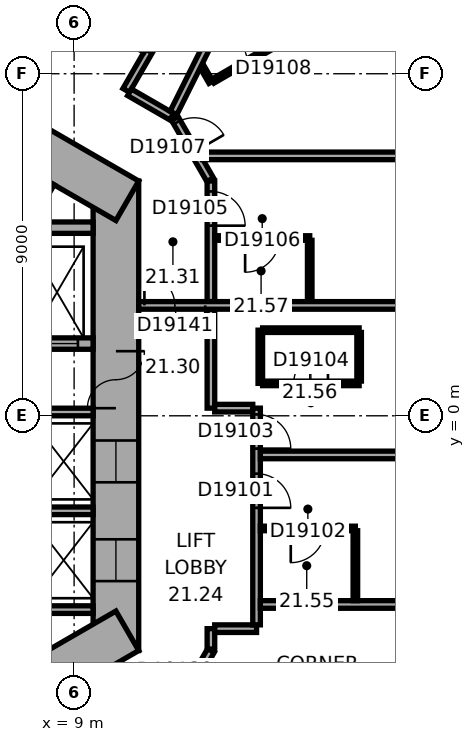
"""IFC4 building model, lengths in metres.
Left out: names, types, materials, properties, quantities, classifications, styles, units other than length and angle.
Written with IfcOpenShell. Run it as: python <this file> out.ifc"""

import sys

from ifc_helpers import new_model, si_unit, direction, frame, frame_2d, origin, place, context, subcontext, project, spatial, rectangle, extrude, element, fill, save


model = new_model("IFC4")
c1 = context("Model", 3, precision=1e-05, world=origin(), true_north=direction((0.0, 1.0)))
c2 = subcontext(c1, "Body", "Model", "MODEL_VIEW")
j1 = project(units=[si_unit("LENGTHUNIT", "METRE"), si_unit("PLANEANGLEUNIT", "RADIAN")], contexts=[c1])
p1 = place(None, origin())
s1 = spatial("IfcSite", under=j1, at=p1, CompositionType="ELEMENT")
p2 = place(p1, origin())
s2 = spatial("IfcBuilding", under=s1, at=p2, CompositionType="ELEMENT")
p3 = place(p2, frame((0.0, 0.0, 93.5)))
s3 = spatial("IfcBuildingStorey", under=s2, at=p3, CompositionType="ELEMENT", Elevation=93.5)
p4 = place(p3, frame((10.1, -6.177, 0.0), z_axis=(0.0, 0.0, 1.0), x_axis=(0.0, 1.0, 0.0)))
e1 = element("IfcWall", 1, at=p4, inside=s3, PredefinedType="SHEAR", context=c2, shape_type="SweptSolid", body=[
    extrude(rectangle(XDim=12.355, YDim=1.2, at=frame_2d((6.177, 0.0))), origin(), (0.0, 0.0, 1.0), 3.3),
])
p5 = place(p4, frame((6.378, 0.0, 0.0)))
e2 = element("IfcOpeningElement", 2, at=p5, cuts=e1, PredefinedType="OPENING", context=c2, shape_type="SweptSolid", body=[
    extrude(rectangle(XDim=1.5, YDim=2.1, at=frame_2d((0.75, 1.05))), frame((0.0, 0.61, 0.0), z_axis=(0.0, -1.0, 0.0), x_axis=(1.0, 0.0, 0.0)), (0.0, 0.0, 1.0), 1.22),
])
p6 = place(p4, frame((1.828, 0.0, 0.0)))
e3 = element("IfcOpeningElement", 3, at=p6, cuts=e1, PredefinedType="OPENING", context=c2, shape_type="SweptSolid", body=[
    extrude(rectangle(XDim=1.1, YDim=2.1, at=frame_2d((0.55, 1.05))), frame((0.0, 0.61, 0.0), z_axis=(0.0, -1.0, 0.0), x_axis=(1.0, 0.0, 0.0)), (0.0, 0.0, 1.0), 1.22),
])
p7 = place(p4, frame((4.427, 0.0, 0.0)))
e4 = element("IfcOpeningElement", 4, at=p7, cuts=e1, PredefinedType="OPENING", context=c2, shape_type="SweptSolid", body=[
    extrude(rectangle(XDim=1.1, YDim=2.1, at=frame_2d((0.55, 1.05))), frame((0.0, 0.61, 0.0), z_axis=(0.0, -1.0, 0.0), x_axis=(1.0, 0.0, 0.0)), (0.0, 0.0, 1.0), 1.22),
])
p8 = place(p3, frame((10.4, 5.658, 0.0), z_axis=(0.0, 0.0, 1.0), x_axis=(-0.866021384402, 0.500006961711, 0.0)))
e5 = element("IfcWall", 5, at=p8, inside=s3, PredefinedType="SHEAR", context=c2, shape_type="SweptSolid", body=[
    extrude(rectangle(XDim=12.355, YDim=1.2, at=frame_2d((6.178, 0.0))), origin(), (0.0, 0.0, 1.0), 3.3),
])
p9 = place(p8, frame((2.728, 0.0, 0.0)))
e6 = element("IfcOpeningElement", 6, at=p9, cuts=e5, PredefinedType="OPENING", context=c2, shape_type="SweptSolid", body=[
    extrude(rectangle(XDim=1.1, YDim=2.1, at=frame_2d((0.55, 1.05))), frame((0.0, 0.61, 0.0), z_axis=(0.0, -1.0, 0.0), x_axis=(1.0, 0.0, 0.0)), (0.0, 0.0, 1.0), 1.22),
])
p10 = place(p8, frame((5.328, 0.0, 0.0)))
e7 = element("IfcOpeningElement", 7, at=p10, cuts=e5, PredefinedType="OPENING", context=c2, shape_type="SweptSolid", body=[
    extrude(rectangle(XDim=1.1, YDim=2.1, at=frame_2d((0.55, 1.05))), frame((0.0, 0.61, 0.0), z_axis=(0.0, -1.0, 0.0), x_axis=(1.0, 0.0, 0.0)), (0.0, 0.0, 1.0), 1.22),
])
p11 = place(p8, frame((7.928, 0.0, 0.0)))
e8 = element("IfcOpeningElement", 8, at=p11, cuts=e5, PredefinedType="OPENING", context=c2, shape_type="SweptSolid", body=[
    extrude(rectangle(XDim=1.1, YDim=2.1, at=frame_2d((0.55, 1.05))), frame((0.0, 0.61, 0.0), z_axis=(0.0, -1.0, 0.0), x_axis=(1.0, 0.0, 0.0)), (0.0, 0.0, 1.0), 1.22),
])
p12 = place(p3, frame((-0.3, -11.836, 0.0), z_axis=(0.0, 0.0, 1.0), x_axis=(0.866021384402, 0.500006961711, 0.0)))
e9 = element("IfcWall", 9, at=p12, inside=s3, PredefinedType="SHEAR", context=c2, shape_type="SweptSolid", body=[
    extrude(rectangle(XDim=12.355, YDim=1.2, at=frame_2d((6.178, 0.0))), origin(), (0.0, 0.0, 1.0), 3.3),
])
p13 = place(p12, frame((2.828, 0.0, 0.0)))
e10 = element("IfcOpeningElement", 10, at=p13, cuts=e9, PredefinedType="OPENING", context=c2, shape_type="SweptSolid", body=[
    extrude(rectangle(XDim=0.9, YDim=2.1, at=frame_2d((0.45, 1.05))), frame((0.0, 0.61, 0.0), z_axis=(0.0, -1.0, 0.0), x_axis=(1.0, 0.0, 0.0)), (0.0, 0.0, 1.0), 1.22),
])
p14 = place(p12, frame((5.428, 0.0, 0.0)))
e11 = element("IfcOpeningElement", 11, at=p14, cuts=e9, PredefinedType="OPENING", context=c2, shape_type="SweptSolid", body=[
    extrude(rectangle(XDim=0.9, YDim=2.1, at=frame_2d((0.45, 1.05))), frame((0.0, 0.61, 0.0), z_axis=(0.0, -1.0, 0.0), x_axis=(1.0, 0.0, 0.0)), (0.0, 0.0, 1.0), 1.22),
])
p15 = place(p12, frame((7.928, 0.0, 0.0)))
e12 = element("IfcOpeningElement", 12, at=p15, cuts=e9, PredefinedType="OPENING", context=c2, shape_type="SweptSolid", body=[
    extrude(rectangle(XDim=1.1, YDim=2.1, at=frame_2d((0.55, 1.05))), frame((0.0, 0.61, 0.0), z_axis=(0.0, -1.0, 0.0), x_axis=(1.0, 0.0, 0.0)), (0.0, 0.0, 1.0), 1.22),
])
for number, where, z_axis, x_axis in (
    (13, (7.3, -5.1, 0.0), (0.0, 0.0, 1.0), (1.0, 0.0, 0.0)),
    (14, (7.3, -2.5, 0.0), (0.0, 0.0, 1.0), (1.0, 0.0, 0.0)),
    (15, (7.3, 0.1, 0.0), (0.0, 0.0, 1.0), (1.0, 0.0, 0.0)),
    (16, (7.287, 4.222, 0.0), (0.0, 0.0, 1.0), (0.5, 0.866, 0.0)),
):
    element("IfcWall", number, at=place(p3, frame(where, z_axis=z_axis, x_axis=x_axis)), inside=s3, PredefinedType="PARTITIONING", context=c2, shape_type="SweptSolid", body=[
        extrude(rectangle(XDim=2.2, YDim=0.2, at=frame_2d((1.1, 0.0))), origin(), (0.0, 0.0, 1.0), 3.05),
    ])
p16 = place(p3, frame((7.3, 1.9, 0.0), z_axis=(0.0, 0.0, 1.0), x_axis=(1.0, 0.0, 0.0)))
e17 = element("IfcWall", 17, at=p16, inside=s3, PredefinedType="SHEAR", context=c2, shape_type="SweptSolid", body=[
    extrude(rectangle(XDim=2.2, YDim=0.3, at=frame_2d((1.1, 0.0))), origin(), (0.0, 0.0, 1.0), 3.05),
])
p17 = place(p16, frame((0.7, 0.0, 0.0)))
e18 = element("IfcOpeningElement", 18, at=p17, cuts=e17, PredefinedType="OPENING", context=c2, shape_type="SweptSolid", body=[
    extrude(rectangle(XDim=1.1, YDim=2.1, at=frame_2d((0.55, 1.05))), frame((0.0, 0.16, 0.0), z_axis=(0.0, -1.0, 0.0), x_axis=(1.0, 0.0, 0.0)), (0.0, 0.0, 1.0), 0.32),
])
p18 = place(p3, frame((7.3, 4.95, 0.0), z_axis=(0.0, 0.0, 1.0), x_axis=(1.0, 0.0, 0.0)))
e19 = element("IfcWall", 19, at=p18, inside=s3, PredefinedType="SHEAR", context=c2, shape_type="SweptSolid", body=[
    extrude(rectangle(XDim=2.2, YDim=0.3, at=frame_2d((1.1, 0.0))), origin(), (0.0, 0.0, 1.0), 3.05),
])
p19 = place(p3, frame((10.371, 8.561, 0.0), z_axis=(0.0, 0.0, 1.0), x_axis=(0.499986357472, 0.866033280158, 0.0)))
e20 = element("IfcWall", 20, at=p19, inside=s3, PredefinedType="PARTITIONING", context=c2, shape_type="SweptSolid", body=[
    extrude(rectangle(XDim=1.201, YDim=0.2, at=frame_2d((0.601, 0.0))), origin(), (0.0, 0.0, 1.0), 3.05),
])
p20 = place(p3, frame((11.566, 7.871, 0.0), z_axis=(0.0, 0.0, 1.0), x_axis=(-0.866004557827, 0.500036104519, 0.0)))
e21 = element("IfcWall", 21, at=p20, inside=s3, PredefinedType="PARTITIONING", context=c2, shape_type="SweptSolid", body=[
    extrude(rectangle(XDim=1.28, YDim=0.2, at=frame_2d((0.64, 0.0))), origin(), (0.0, 0.0, 1.0), 3.05),
])
p21 = place(p3, frame((11.67, -7.788, 0.0), z_axis=(0.0, 0.0, 1.0), x_axis=(0.500063286585, 0.865988862174, 0.0)))
e22 = element("IfcWall", 22, at=p21, inside=s3, PredefinedType="PARTITIONING", context=c2, shape_type="SweptSolid", body=[
    extrude(rectangle(XDim=1.86, YDim=0.2, at=frame_2d((0.93, 0.0))), origin(), (0.0, 0.0, 1.0), 3.05),
])
p22 = place(p21, frame((0.43, 0.0, 0.0)))
e23 = element("IfcOpeningElement", 23, at=p22, cuts=e22, PredefinedType="OPENING", context=c2, shape_type="SweptSolid", body=[
    extrude(rectangle(XDim=1.0, YDim=2.1, at=frame_2d((0.5, 1.05))), frame((0.0, 0.11, 0.0), z_axis=(0.0, -1.0, 0.0), x_axis=(1.0, 0.0, 0.0)), (0.0, 0.0, 1.0), 0.22),
])
p23 = place(p3, frame((12.58, 6.212, 0.0), z_axis=(0.0, 0.0, 1.0), x_axis=(-0.500063286585, 0.865988862174, 0.0)))
e24 = element("IfcWall", 24, at=p23, inside=s3, PredefinedType="PARTITIONING", context=c2, shape_type="SweptSolid", body=[
    extrude(rectangle(XDim=1.86, YDim=0.2, at=frame_2d((0.93, 0.0))), origin(), (0.0, 0.0, 1.0), 3.05),
])
p24 = place(p23, frame((0.842, 0.0, 0.0)))
e25 = element("IfcOpeningElement", 25, at=p24, cuts=e24, PredefinedType="OPENING", context=c2, shape_type="SweptSolid", body=[
    extrude(rectangle(XDim=0.9, YDim=2.1, at=frame_2d((0.45, 1.05))), frame((0.0, 0.11, 0.0), z_axis=(0.0, -1.0, 0.0), x_axis=(1.0, 0.0, 0.0)), (0.0, 0.0, 1.0), 0.22),
])
p25 = place(p3, frame((12.6, -6.138, 0.0), z_axis=(0.0, 0.0, 1.0), x_axis=(0.0, 1.0, 0.0)))
e26 = element("IfcWall", 26, at=p25, inside=s3, PredefinedType="PARTITIONING", context=c2, shape_type="SweptSolid", body=[
    extrude(rectangle(XDim=0.537, YDim=0.2, at=frame_2d((0.268, 0.0))), origin(), (0.0, 0.0, 1.0), 3.05),
])
p26 = place(p3, frame((12.6, 0.201, 0.0), z_axis=(0.0, 0.0, 1.0), x_axis=(0.0, 1.0, 0.0)))
e27 = element("IfcWall", 27, at=p26, inside=s3, PredefinedType="PARTITIONING", context=c2, shape_type="SweptSolid", body=[
    extrude(rectangle(XDim=2.604, YDim=0.2, at=frame_2d((1.302, 0.0))), origin(), (0.0, 0.0, 1.0), 3.05),
])
p27 = place(p3, frame((12.6, 3.004, 0.0), z_axis=(0.0, 0.0, 1.0), x_axis=(0.0, 1.0, 0.0)))
e28 = element("IfcWall", 28, at=p27, inside=s3, PredefinedType="PARTITIONING", context=c2, shape_type="SweptSolid", body=[
    extrude(rectangle(XDim=3.173, YDim=0.2, at=frame_2d((1.586, 0.0))), origin(), (0.0, 0.0, 1.0), 3.05),
])
p28 = place(p27, frame((1.998, 0.0, 0.0)))
e29 = element("IfcOpeningElement", 29, at=p28, cuts=e28, PredefinedType="OPENING", context=c2, shape_type="SweptSolid", body=[
    extrude(rectangle(XDim=0.9, YDim=2.1, at=frame_2d((0.45, 1.05))), frame((0.0, 0.11, 0.0), z_axis=(0.0, -1.0, 0.0), x_axis=(1.0, 0.0, 0.0)), (0.0, 0.0, 1.0), 0.22),
])
p29 = place(p3, frame((12.601, 8.776, 0.0), z_axis=(0.0, 0.0, 1.0), x_axis=(-0.500166486798, 0.865929261247, 0.0)))
e30 = element("IfcWall", 30, at=p29, inside=s3, PredefinedType="PARTITIONING", context=c2, shape_type="SweptSolid", body=[
    extrude(rectangle(XDim=0.476, YDim=0.12, at=frame_2d((0.238, 0.0))), origin(), (0.0, 0.0, 1.0), 3.05),
])
p30 = place(p3, frame((12.7, -5.601, 0.0), z_axis=(0.0, 0.0, 1.0), x_axis=(1.0, 0.0, 0.0)))
e31 = element("IfcWall", 31, at=p30, inside=s3, PredefinedType="PARTITIONING", context=c2, shape_type="SweptSolid", body=[
    extrude(rectangle(XDim=1.101, YDim=0.2, at=frame_2d((0.551, 0.0))), origin(), (0.0, 0.0, 1.0), 3.05),
])
p31 = place(p3, frame((12.7, 4.677, 0.0), z_axis=(0.0, 0.0, 1.0), x_axis=(1.0, 0.0, 0.0)))
e32 = element("IfcWall", 32, at=p31, inside=s3, PredefinedType="PARTITIONING", context=c2, shape_type="SweptSolid", body=[
    extrude(rectangle(XDim=2.5, YDim=0.12, at=frame_2d((1.25, 0.0))), origin(), (0.0, 0.0, 1.0), 3.05),
])
p32 = place(p31, frame((0.8, 0.0, 0.0)))
e33 = element("IfcOpeningElement", 33, at=p32, cuts=e32, PredefinedType="OPENING", context=c2, shape_type="SweptSolid", body=[
    extrude(rectangle(XDim=0.9, YDim=2.1, at=frame_2d((0.45, 1.05))), frame((0.0, 0.07, 0.0), z_axis=(0.0, -1.0, 0.0), x_axis=(1.0, 0.0, 0.0)), (0.0, 0.0, 1.0), 0.14),
])
p33 = place(p3, frame((13.701, 0.201, 0.0), z_axis=(0.0, 0.0, 1.0), x_axis=(-1.0, 0.0, 0.0)))
e34 = element("IfcWall", 34, at=p33, inside=s3, PredefinedType="PARTITIONING", context=c2, shape_type="SweptSolid", body=[
    extrude(rectangle(XDim=1.001, YDim=0.2, at=frame_2d((0.5, 0.0))), origin(), (0.0, 0.0, 1.0), 3.05),
])
p34 = place(p3, frame((13.801, -5.501, 0.0), z_axis=(0.0, 0.0, 1.0), x_axis=(0.0, 1.0, 0.0)))
e35 = element("IfcWall", 35, at=p34, inside=s3, PredefinedType="PARTITIONING", context=c2, shape_type="SweptSolid", body=[
    extrude(rectangle(XDim=5.702, YDim=0.2, at=frame_2d((2.851, 0.0))), origin(), (0.0, 0.0, 1.0), 3.05),
])
p35 = place(p34, frame((3.079, 0.0, 0.0)))
e36 = element("IfcOpeningElement", 36, at=p35, cuts=e35, PredefinedType="OPENING", context=c2, shape_type="SweptSolid", body=[
    extrude(rectangle(XDim=0.9, YDim=2.1, at=frame_2d((0.45, 1.05))), frame((0.0, 0.11, 0.0), z_axis=(0.0, -1.0, 0.0), x_axis=(1.0, 0.0, 0.0)), (0.0, 0.0, 1.0), 0.22),
])
p36 = place(p34, frame((4.636, 0.0, 0.0)))
e37 = element("IfcOpeningElement", 37, at=p36, cuts=e35, PredefinedType="OPENING", context=c2, shape_type="SweptSolid", body=[
    extrude(rectangle(XDim=0.9, YDim=2.1, at=frame_2d((0.45, 1.05))), frame((0.0, 0.11, 0.0), z_axis=(0.0, -1.0, 0.0), x_axis=(1.0, 0.0, 0.0)), (0.0, 0.0, 1.0), 0.22),
])
p37 = place(p3, frame((13.901, -4.965, 0.0), z_axis=(0.0, 0.0, 1.0), x_axis=(1.0, 0.0, 0.0)))
e38 = element("IfcWall", 38, at=p37, inside=s3, PredefinedType="PARTITIONING", context=c2, shape_type="SweptSolid", body=[
    extrude(rectangle(XDim=8.049, YDim=0.2, at=frame_2d((4.024, 0.0))), origin(), (0.0, 0.0, 1.0), 3.05),
])
p38 = place(p3, frame((13.901, -2.965, 0.0), z_axis=(0.0, 0.0, 1.0), x_axis=(1.0, 0.0, 0.0)))
e39 = element("IfcWall", 39, at=p38, inside=s3, PredefinedType="PARTITIONING", context=c2, shape_type="SweptSolid", body=[
    extrude(rectangle(XDim=2.5, YDim=0.12, at=frame_2d((1.25, 0.0))), origin(), (0.0, 0.0, 1.0), 3.05),
])
p39 = place(p38, frame((0.8, 0.0, 0.0)))
e40 = element("IfcOpeningElement", 40, at=p39, cuts=e39, PredefinedType="OPENING", context=c2, shape_type="SweptSolid", body=[
    extrude(rectangle(XDim=0.9, YDim=2.1, at=frame_2d((0.45, 1.05))), frame((0.0, 0.07, 0.0), z_axis=(0.0, -1.0, 0.0), x_axis=(1.0, 0.0, 0.0)), (0.0, 0.0, 1.0), 0.14),
])
p40 = place(p3, frame((13.9, 0.853, 0.0), z_axis=(0.0, 0.0, 1.0), x_axis=(0.0, 1.0, 0.0)))
e41 = element("IfcWall", 41, at=p40, inside=s3, PredefinedType="PARTITIONING", context=c2, shape_type="SweptSolid", body=[
    extrude(rectangle(XDim=1.4, YDim=0.12, at=frame_2d((0.7, 0.0))), origin(), (0.0, 0.0, 1.0), 3.05),
])
p41 = place(p3, frame((13.96, 2.253, 0.0), z_axis=(0.0, 0.0, 1.0), x_axis=(1.0, 0.0, 0.0)))
e42 = element("IfcWall", 42, at=p41, inside=s3, PredefinedType="PARTITIONING", context=c2, shape_type="SweptSolid", body=[
    extrude(rectangle(XDim=2.54, YDim=0.12, at=frame_2d((1.27, 0.0))), origin(), (0.0, 0.0, 1.0), 3.05),
])
p42 = place(p3, frame((14.974, 10.146, 0.0), z_axis=(0.0, 0.0, 1.0), x_axis=(-0.86599746015, -0.500048396672, 0.0)))
e43 = element("IfcWall", 43, at=p42, inside=s3, PredefinedType="PARTITIONING", context=c2, shape_type="SweptSolid", body=[
    extrude(rectangle(XDim=2.68, YDim=0.12, at=frame_2d((1.34, 0.0))), origin(), (0.0, 0.0, 1.0), 3.05),
])
p43 = place(p42, frame((0.69, 0.0, 0.0)))
e44 = element("IfcOpeningElement", 44, at=p43, cuts=e43, PredefinedType="OPENING", context=c2, shape_type="SweptSolid", body=[
    extrude(rectangle(XDim=0.9, YDim=2.1, at=frame_2d((0.45, 1.05))), frame((0.0, 0.07, 0.0), z_axis=(0.0, -1.0, 0.0), x_axis=(1.0, 0.0, 0.0)), (0.0, 0.0, 1.0), 0.14),
])
p44 = place(p3, frame((15.2, 4.618, 0.0), z_axis=(0.0, 0.0, 1.0), x_axis=(0.0, -1.0, 0.0)))
e45 = element("IfcWall", 45, at=p44, inside=s3, PredefinedType="PARTITIONING", context=c2, shape_type="SweptSolid", body=[
    extrude(rectangle(XDim=1.613, YDim=0.12, at=frame_2d((0.807, 0.0))), origin(), (0.0, 0.0, 1.0), 3.05),
])
p45 = place(p3, frame((15.915, 16.592, 0.0), z_axis=(0.0, 0.0, 1.0), x_axis=(-0.446199736347, -0.894933402709, 0.0)))
e46 = element("IfcWall", 46, at=p45, inside=s3, PredefinedType="PARTITIONING", context=c2, shape_type="SweptSolid", body=[
    extrude(rectangle(XDim=9.635, YDim=0.2, at=frame_2d((4.817, 0.0))), origin(), (0.0, 0.0, 1.0), 3.05),
])
p46 = place(p3, frame((16.401, -3.025, 0.0), z_axis=(0.0, 0.0, 1.0), x_axis=(0.0, -1.0, 0.0)))
e47 = element("IfcWall", 47, at=p46, inside=s3, PredefinedType="PARTITIONING", context=c2, shape_type="SweptSolid", body=[
    extrude(rectangle(XDim=1.84, YDim=0.12, at=frame_2d((0.92, 0.0))), origin(), (0.0, 0.0, 1.0), 3.05),
])
p47 = place(p3, frame((16.5, 0.853, 0.0), z_axis=(0.0, 0.0, 1.0), x_axis=(-1.0, 0.0, 0.0)))
e48 = element("IfcWall", 48, at=p47, inside=s3, PredefinedType="PARTITIONING", context=c2, shape_type="SweptSolid", body=[
    extrude(rectangle(XDim=2.54, YDim=0.12, at=frame_2d((1.27, 0.0))), origin(), (0.0, 0.0, 1.0), 3.05),
])
p48 = place(p47, frame((0.82, 0.0, 0.0)))
e49 = element("IfcOpeningElement", 49, at=p48, cuts=e48, PredefinedType="OPENING", context=c2, shape_type="SweptSolid", body=[
    extrude(rectangle(XDim=0.9, YDim=2.1, at=frame_2d((0.45, 1.05))), frame((0.0, 0.07, 0.0), z_axis=(0.0, -1.0, 0.0), x_axis=(1.0, 0.0, 0.0)), (0.0, 0.0, 1.0), 0.14),
])
p49 = place(p3, frame((16.5, 2.193, 0.0), z_axis=(0.0, 0.0, 1.0), x_axis=(0.0, -1.0, 0.0)))
e50 = element("IfcWall", 50, at=p49, inside=s3, PredefinedType="PARTITIONING", context=c2, shape_type="SweptSolid", body=[
    extrude(rectangle(XDim=1.28, YDim=0.12, at=frame_2d((0.64, 0.0))), origin(), (0.0, 0.0, 1.0), 3.05),
])
p50 = place(p3, frame((21.95, -1.03, 0.0), z_axis=(0.0, 0.0, 1.0), x_axis=(-1.0, 0.0, 0.0)))
e51 = element("IfcWall", 51, at=p50, inside=s3, PredefinedType="PARTITIONING", context=c2, shape_type="SweptSolid", body=[
    extrude(rectangle(XDim=8.049, YDim=0.2, at=frame_2d((4.024, 0.0))), origin(), (0.0, 0.0, 1.0), 2.6),
])
p51 = place(p3, frame((21.95, 2.905, 0.0), z_axis=(0.0, 0.0, 1.0), x_axis=(-1.0, 0.0, 0.0)))
e52 = element("IfcWall", 52, at=p51, inside=s3, PredefinedType="PARTITIONING", context=c2, shape_type="SweptSolid", body=[
    extrude(rectangle(XDim=11.25, YDim=0.2, at=frame_2d((5.625, 0.0))), origin(), (0.0, 0.0, 1.0), 3.05),
])
p52 = place(p51, frame((9.5, 0.0, 0.0)))
e53 = element("IfcOpeningElement", 53, at=p52, cuts=e52, PredefinedType="OPENING", context=c2, shape_type="SweptSolid", body=[
    extrude(rectangle(XDim=1.6, YDim=2.1, at=frame_2d((0.8, 1.05))), frame((0.0, 0.11, 0.0), z_axis=(0.0, -1.0, 0.0), x_axis=(1.0, 0.0, 0.0)), (0.0, 0.0, 1.0), 0.22),
])
p53 = place(p3, frame((21.95, 6.839, 0.0), z_axis=(0.0, 0.0, 1.0), x_axis=(-1.0, 0.0, 0.0)))
e54 = element("IfcWall", 54, at=p53, inside=s3, PredefinedType="PARTITIONING", context=c2, shape_type="SweptSolid", body=[
    extrude(rectangle(XDim=9.572, YDim=0.2, at=frame_2d((4.786, 0.0))), origin(), (0.0, 0.0, 1.0), 3.05),
])
p54 = place(p5, origin())
e55 = element("IfcDoor", 55, at=p54, inside=s3, OperationType="DOUBLE_DOOR_SINGLE_SWING", PredefinedType="DOOR", context=c2, shape_type="SweptSolid", body=[
    extrude(rectangle(XDim=1.5, YDim=2.1, at=frame_2d((0.75, 1.05))), frame((0.0, 0.025, 0.0), z_axis=(0.0, -1.0, 0.0), x_axis=(1.0, 0.0, 0.0)), (0.0, 0.0, 1.0), 0.05),
])
fill(e2, e55)
p55 = place(p17, origin())
e56 = element("IfcDoor", 56, at=p55, inside=s3, OperationType="DOUBLE_DOOR_SLIDING", PredefinedType="DOOR", context=c2, shape_type="SweptSolid", body=[
    extrude(rectangle(XDim=1.1, YDim=2.1, at=frame_2d((0.55, 1.05))), frame((0.0, 0.025, 0.0), z_axis=(0.0, -1.0, 0.0), x_axis=(1.0, 0.0, 0.0)), (0.0, 0.0, 1.0), 0.05),
])
fill(e18, e56)
p56 = place(p6, origin())
e57 = element("IfcDoor", 57, at=p56, inside=s3, OperationType="DOUBLE_DOOR_SLIDING", PredefinedType="DOOR", context=c2, shape_type="SweptSolid", body=[
    extrude(rectangle(XDim=1.1, YDim=2.1, at=frame_2d((0.55, 1.05))), frame((0.0, 0.025, 0.0), z_axis=(0.0, -1.0, 0.0), x_axis=(1.0, 0.0, 0.0)), (0.0, 0.0, 1.0), 0.05),
])
fill(e3, e57)
p57 = place(p7, origin())
e58 = element("IfcDoor", 58, at=p57, inside=s3, OperationType="DOUBLE_DOOR_SLIDING", PredefinedType="DOOR", context=c2, shape_type="SweptSolid", body=[
    extrude(rectangle(XDim=1.1, YDim=2.1, at=frame_2d((0.55, 1.05))), frame((0.0, 0.025, 0.0), z_axis=(0.0, -1.0, 0.0), x_axis=(1.0, 0.0, 0.0)), (0.0, 0.0, 1.0), 0.05),
])
fill(e4, e58)
p58 = place(p35, origin())
e59 = element("IfcDoor", 59, at=p58, inside=s3, OperationType="SINGLE_SWING_LEFT", PredefinedType="DOOR", context=c2, shape_type="SweptSolid", body=[
    extrude(rectangle(XDim=0.9, YDim=2.1, at=frame_2d((0.45, 1.05))), frame((0.0, 0.025, 0.0), z_axis=(0.0, -1.0, 0.0), x_axis=(1.0, 0.0, 0.0)), (0.0, 0.0, 1.0), 0.05),
])
fill(e36, e59)
p59 = place(p39, origin())
e60 = element("IfcDoor", 60, at=p59, inside=s3, OperationType="SINGLE_SWING_LEFT", PredefinedType="DOOR", context=c2, shape_type="SweptSolid", body=[
    extrude(rectangle(XDim=0.9, YDim=2.1, at=frame_2d((0.45, 1.05))), frame((0.0, 0.025, 0.0), z_axis=(0.0, -1.0, 0.0), x_axis=(1.0, 0.0, 0.0)), (0.0, 0.0, 1.0), 0.05),
])
fill(e40, e60)
p60 = place(p36, origin())
e61 = element("IfcDoor", 61, at=p60, inside=s3, OperationType="SINGLE_SWING_LEFT", PredefinedType="DOOR", context=c2, shape_type="SweptSolid", body=[
    extrude(rectangle(XDim=0.9, YDim=2.1, at=frame_2d((0.45, 1.05))), frame((0.0, 0.025, 0.0), z_axis=(0.0, -1.0, 0.0), x_axis=(1.0, 0.0, 0.0)), (0.0, 0.0, 1.0), 0.05),
])
fill(e37, e61)
p61 = place(p48, origin())
e62 = element("IfcDoor", 62, at=p61, inside=s3, OperationType="SINGLE_SWING_LEFT", PredefinedType="DOOR", context=c2, shape_type="SweptSolid", body=[
    extrude(rectangle(XDim=0.9, YDim=2.1, at=frame_2d((0.45, 1.05))), frame((0.0, 0.025, 0.0), z_axis=(0.0, -1.0, 0.0), x_axis=(1.0, 0.0, 0.0)), (0.0, 0.0, 1.0), 0.05),
])
fill(e49, e62)
p62 = place(p28, origin())
e63 = element("IfcDoor", 63, at=p62, inside=s3, OperationType="SINGLE_SWING_LEFT", PredefinedType="DOOR", context=c2, shape_type="SweptSolid", body=[
    extrude(rectangle(XDim=0.9, YDim=2.1, at=frame_2d((0.45, 1.05))), frame((0.0, 0.025, 0.0), z_axis=(0.0, -1.0, 0.0), x_axis=(1.0, 0.0, 0.0)), (0.0, 0.0, 1.0), 0.05),
])
fill(e29, e63)
p63 = place(p32, origin())
e64 = element("IfcDoor", 64, at=p63, inside=s3, OperationType="SINGLE_SWING_LEFT", PredefinedType="DOOR", context=c2, shape_type="SweptSolid", body=[
    extrude(rectangle(XDim=0.9, YDim=2.1, at=frame_2d((0.45, 1.05))), frame((0.0, 0.025, 0.0), z_axis=(0.0, -1.0, 0.0), x_axis=(1.0, 0.0, 0.0)), (0.0, 0.0, 1.0), 0.05),
])
fill(e33, e64)
p64 = place(p24, origin())
e65 = element("IfcDoor", 65, at=p64, inside=s3, OperationType="SINGLE_SWING_LEFT", PredefinedType="DOOR", context=c2, shape_type="SweptSolid", body=[
    extrude(rectangle(XDim=0.9, YDim=2.1, at=frame_2d((0.45, 1.05))), frame((0.0, 0.025, 0.0), z_axis=(0.0, -1.0, 0.0), x_axis=(1.0, 0.0, 0.0)), (0.0, 0.0, 1.0), 0.05),
])
fill(e25, e65)
p65 = place(p43, origin())
e66 = element("IfcDoor", 66, at=p65, inside=s3, OperationType="SINGLE_SWING_LEFT", PredefinedType="DOOR", context=c2, shape_type="SweptSolid", body=[
    extrude(rectangle(XDim=0.9, YDim=2.1, at=frame_2d((0.45, 1.05))), frame((0.0, 0.025, 0.0), z_axis=(0.0, -1.0, 0.0), x_axis=(1.0, 0.0, 0.0)), (0.0, 0.0, 1.0), 0.05),
])
fill(e44, e66)
p66 = place(p52, origin())
e67 = element("IfcDoor", 67, at=p66, inside=s3, OperationType="DOUBLE_DOOR_SINGLE_SWING", PredefinedType="DOOR", context=c2, shape_type="SweptSolid", body=[
    extrude(rectangle(XDim=1.6, YDim=2.1, at=frame_2d((0.8, 1.05))), frame((0.0, 0.025, 0.0), z_axis=(0.0, -1.0, 0.0), x_axis=(1.0, 0.0, 0.0)), (0.0, 0.0, 1.0), 0.05),
])
fill(e53, e67)
save(model, sys.argv[1])
